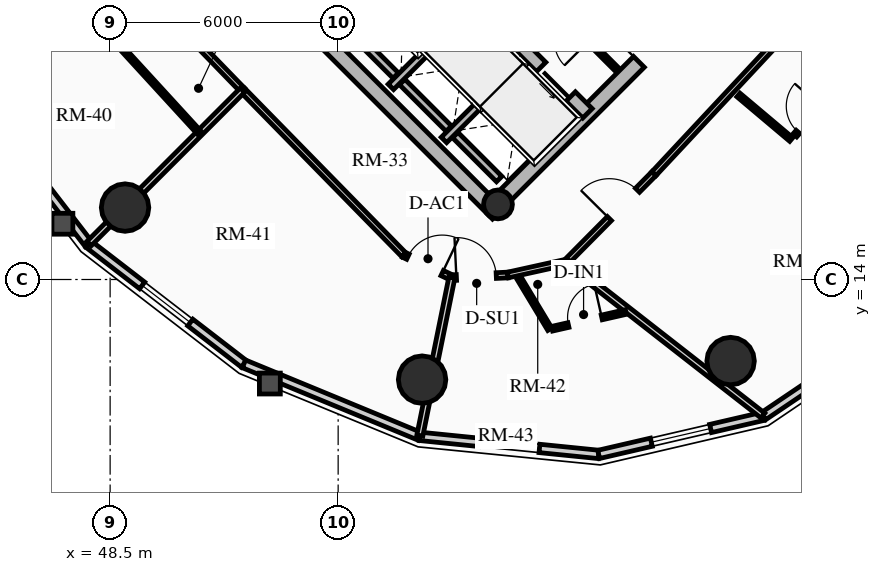
"""IFC4 building model, lengths in metres.
Left out: names, types, materials, properties, quantities, classifications, styles, units other than length and angle.
Written with IfcOpenShell. Run it as: python <this file> out.ifc"""

import sys

from ifc_helpers import new_model, si_unit, direction, frame, frame_2d, origin, origin_2d, place, context, subcontext, project, spatial, rectangle, circle, hollow_circle, extrude, source, transform, mapped, element, fill, save


model = new_model("IFC4")
c1 = context("Model", 3, precision=1e-05, world=origin(), true_north=direction((0.0, 1.0)))
c2 = subcontext(c1, "Body", "Model", "MODEL_VIEW")
j1 = project(units=[si_unit("LENGTHUNIT", "METRE"), si_unit("PLANEANGLEUNIT", "RADIAN")], contexts=[c1])
p1 = place(None, origin())
s1 = spatial("IfcSite", under=j1, at=p1, CompositionType="ELEMENT")
p2 = place(p1, origin())
s2 = spatial("IfcBuilding", under=s1, at=p2, CompositionType="ELEMENT")
p3 = place(p2, frame((0.0, 0.0, 183.61)))
s3 = spatial("IfcBuildingStorey", under=s2, at=p3, CompositionType="ELEMENT", Elevation=183.61)
p4 = place(p3, frame((58.702, 15.732, 0.0), z_axis=(0.0, 0.0, 1.0), x_axis=(-0.707106781187, 0.707106781187, 0.0)))
e1 = element("IfcWall", 1, at=p4, inside=s3, PredefinedType="SHEAR", context=c2, shape_type="SweptSolid", body=[
    extrude(rectangle(XDim=14.1, YDim=0.4, at=frame_2d((7.05, 0.0))), origin(), (0.0, 0.0, 1.0), 2.91),
])
p5 = place(p3, frame((58.561, 15.873, 0.0), z_axis=(0.0, 0.0, 1.0), x_axis=(0.707106781187, 0.707106781187, 0.0)))
e2 = element("IfcWall", 2, at=p5, inside=s3, PredefinedType="SHEAR", context=c2, shape_type="SweptSolid", body=[
    extrude(rectangle(XDim=10.7, YDim=0.4, at=frame_2d((5.35, 0.0))), origin(), (0.0, 0.0, 1.0), 2.91),
])
m1 = source(origin(), c2, "Body", "SweptSolid", [
    extrude(rectangle(XDim=1.5, YDim=2.02, at=frame_2d((0.75, 1.01))), frame((0.0, 0.21, 0.0), z_axis=(0.0, -1.0, 0.0), x_axis=(1.0, 0.0, 0.0)), (0.0, 0.0, 1.0), 0.42),
])
p6 = place(p5, frame((5.45, 0.0, 0.0)))
e3 = element("IfcOpeningElement", 3, at=p6, cuts=e2, PredefinedType="OPENING", context=c2, shape_type="MappedRepresentation", body=[
    mapped(m1, transform((0.0, 0.0, 0.0), x_axis=(1.0, 0.0, 0.0), y_axis=(0.0, 1.0, 0.0), z_axis=(0.0, 0.0, 1.0), scale=1.0)),
])
p7 = place(p3, frame((61.06, 18.373, 0.0), z_axis=(0.0, 0.0, 1.0), x_axis=(-0.707106781187, 0.707106781187, 0.0)))
e4 = element("IfcWall", 4, at=p7, inside=s3, PredefinedType="SHEAR", context=c2, shape_type="SweptSolid", body=[
    extrude(rectangle(XDim=13.7, YDim=0.35, at=frame_2d((6.85, 0.0))), origin(), (0.0, 0.0, 1.0), 2.91),
])
m2 = source(origin(), c2, "Body", "SweptSolid", [
    extrude(rectangle(XDim=1.1, YDim=2.015, at=frame_2d((0.55, 1.007))), frame((0.0, 0.185, 0.0), z_axis=(0.0, -1.0, 0.0), x_axis=(1.0, 0.0, 0.0)), (0.0, 0.0, 1.0), 0.37),
])
p8 = place(p7, frame((4.85, 0.0, 0.0)))
e5 = element("IfcOpeningElement", 5, at=p8, cuts=e4, PredefinedType="OPENING", context=c2, shape_type="MappedRepresentation", body=[
    mapped(m2, transform((0.0, 0.0, 0.0), x_axis=(1.0, 0.0, 0.0), y_axis=(0.0, 1.0, 0.0), z_axis=(0.0, 0.0, 1.0), scale=1.0)),
])
p9 = place(p7, frame((0.625, 0.0, 0.0)))
e6 = element("IfcOpeningElement", 6, at=p9, cuts=e4, PredefinedType="OPENING", context=c2, shape_type="MappedRepresentation", body=[
    mapped(m2, transform((0.0, 0.0, 0.0), x_axis=(1.0, 0.0, 0.0), y_axis=(0.0, 1.0, 0.0), z_axis=(0.0, 0.0, 1.0), scale=1.0)),
])
p10 = place(p7, frame((2.625, 0.0, 0.0)))
e7 = element("IfcOpeningElement", 7, at=p10, cuts=e4, PredefinedType="OPENING", context=c2, shape_type="MappedRepresentation", body=[
    mapped(m2, transform((0.0, 0.0, 0.0), x_axis=(1.0, 0.0, 0.0), y_axis=(0.0, 1.0, 0.0), z_axis=(0.0, 0.0, 1.0), scale=1.0)),
])
m3 = source(origin(), c2, "Body", "SweptSolid", [
    extrude(rectangle(XDim=1.15, YDim=2.02, at=frame_2d((0.575, 1.01))), frame((0.0, 0.185, 0.0), z_axis=(0.0, -1.0, 0.0), x_axis=(1.0, 0.0, 0.0)), (0.0, 0.0, 1.0), 0.37),
])
p11 = place(p7, frame((7.27, 0.0, 0.0)))
e8 = element("IfcOpeningElement", 8, at=p11, cuts=e4, PredefinedType="OPENING", context=c2, shape_type="MappedRepresentation", body=[
    mapped(m3, transform((0.0, 0.0, 0.0), x_axis=(1.0, 0.0, 0.0), y_axis=(0.0, 1.0, 0.0), z_axis=(0.0, 0.0, 1.0), scale=1.0)),
])
p12 = place(p3, frame((58.706, 15.976, 0.0), z_axis=(0.0, 0.0, 1.0), x_axis=(0.707106781187, 0.707106781187, 0.0)))
e9 = element("IfcColumn", 9, at=p12, inside=s3, PredefinedType="COLUMN", context=c2, shape_type="SweptSolid", body=[
    extrude(hollow_circle(Radius=0.38, WallThickness=0.032, at=origin_2d()), origin(), (0.0, 0.0, 1.0), 2.91),
])
for number, where, z_axis, x_axis in (
    (10, (48.893, 15.893, 0.0), (0.0, 0.0, 1.0), (1.0, 0.0, 0.0)),
    (11, (56.709, 11.365, 0.0), (0.0, 0.0, 1.0), (1.0, 0.0, 0.0)),
    (12, (64.827, 11.854, 0.0), (0.0, 0.0, 1.0), (1.0, 0.0, 0.0)),
):
    element("IfcColumn", number, at=place(p3, frame(where, z_axis=z_axis, x_axis=x_axis)), inside=s3, PredefinedType="USERDEFINED", context=c2, shape_type="SweptSolid", body=[
        extrude(circle(Radius=0.625, at=origin_2d()), origin(), (0.0, 0.0, 1.0), 2.91),
    ])
p13 = place(p3, frame((47.932, 14.932, 0.0), z_axis=(0.0, 0.0, 1.0), x_axis=(-0.610569654715, 0.791962560189, 0.0)))
e13 = element("IfcWall", 13, at=p13, inside=s3, PredefinedType="SOLIDWALL", context=c2, shape_type="SweptSolid", body=[
    extrude(rectangle(XDim=5.163, YDim=0.22, at=frame_2d((2.582, 0.0))), origin(), (0.0, 0.0, 1.0), 2.245),
])
p14 = place(p3, frame((52.021, 11.78, 0.0), z_axis=(0.0, 0.0, 1.0), x_axis=(-0.791962560189, 0.610569654715, 0.0)))
e14 = element("IfcWall", 14, at=p14, inside=s3, PredefinedType="SOLIDWALL", context=c2, shape_type="SweptSolid", body=[
    extrude(rectangle(XDim=5.163, YDim=0.22, at=frame_2d((2.582, 0.0))), origin(), (0.0, 0.0, 1.0), 2.245),
])
m4 = source(origin(), c2, "Body", "SweptSolid", [
    extrude(rectangle(XDim=1.6, YDim=1.3, at=frame_2d((0.8, 0.65))), frame((0.0, 0.12, 0.0), z_axis=(0.0, -1.0, 0.0), x_axis=(1.0, 0.0, 0.0)), (0.0, 0.0, 1.0), 0.24),
])
p15 = place(p14, frame((1.782, 0.0, 0.65)))
e15 = element("IfcOpeningElement", 15, at=p15, cuts=e14, PredefinedType="OPENING", context=c2, shape_type="MappedRepresentation", body=[
    mapped(m4, transform((0.0, 0.0, 0.0), x_axis=(1.0, 0.0, 0.0), y_axis=(0.0, 1.0, 0.0), z_axis=(0.0, 0.0, 1.0), scale=1.0)),
])
p16 = place(p3, frame((56.646, 9.873, 0.0), z_axis=(0.0, 0.0, 1.0), x_axis=(-0.924494066201, 0.381196434348, 0.0)))
e16 = element("IfcWall", 16, at=p16, inside=s3, PredefinedType="SOLIDWALL", context=c2, shape_type="SweptSolid", body=[
    extrude(rectangle(XDim=5.003, YDim=0.22, at=frame_2d((2.501, 0.0))), origin(), (0.0, 0.0, 1.0), 2.245),
])
p17 = place(p3, frame((61.355, 9.397, 0.0), z_axis=(0.0, 0.0, 1.0), x_axis=(-0.994943283129, 0.100438356004, 0.0)))
e17 = element("IfcWall", 17, at=p17, inside=s3, PredefinedType="SOLIDWALL", context=c2, shape_type="SweptSolid", body=[
    extrude(rectangle(XDim=4.733, YDim=0.22, at=frame_2d((2.366, 0.0))), origin(), (0.0, 0.0, 1.0), 2.245),
])
p18 = place(p17, frame((1.566, 0.0, 0.65)))
e18 = element("IfcOpeningElement", 18, at=p18, cuts=e17, PredefinedType="OPENING", context=c2, shape_type="MappedRepresentation", body=[
    mapped(m4, transform((0.0, 0.0, 0.0), x_axis=(1.0, 0.0, 0.0), y_axis=(0.0, 1.0, 0.0), z_axis=(0.0, 0.0, 1.0), scale=1.0)),
])
p19 = place(p3, frame((65.687, 10.4, 0.0), z_axis=(0.0, 0.0, 1.0), x_axis=(-0.97422620202, -0.22557328587, 0.0)))
e19 = element("IfcWall", 19, at=p19, inside=s3, PredefinedType="SOLIDWALL", context=c2, shape_type="SweptSolid", body=[
    extrude(rectangle(XDim=4.446, YDim=0.22, at=frame_2d((2.223, 0.0))), origin(), (0.0, 0.0, 1.0), 2.245),
])
p20 = place(p19, frame((1.423, 0.0, 0.65)))
e20 = element("IfcOpeningElement", 20, at=p20, cuts=e19, PredefinedType="OPENING", context=c2, shape_type="MappedRepresentation", body=[
    mapped(m4, transform((0.0, 0.0, 0.0), x_axis=(1.0, 0.0, 0.0), y_axis=(0.0, 1.0, 0.0), z_axis=(0.0, 0.0, 1.0), scale=1.0)),
])
p21 = place(p3, frame((69.217, 12.783, 0.0), z_axis=(0.0, 0.0, 1.0), x_axis=(-0.828817439852, -0.55951912514, 0.0)))
e21 = element("IfcWall", 21, at=p21, inside=s3, PredefinedType="SOLIDWALL", context=c2, shape_type="SweptSolid", body=[
    extrude(rectangle(XDim=4.259, YDim=0.22, at=frame_2d((2.129, 0.0))), origin(), (0.0, 0.0, 1.0), 2.245),
])
p22 = place(p3, frame((55.888, 19.069, 0.0), z_axis=(0.0, 0.0, 1.0), x_axis=(0.707106781187, 0.707106781187, 0.0)))
e22 = element("IfcWall", 22, at=p22, inside=s3, PredefinedType="SHEAR", context=c2, shape_type="SweptSolid", body=[
    extrude(rectangle(XDim=2.97, YDim=0.2, at=frame_2d((1.485, 0.0))), origin(), (0.0, 0.0, 1.0), 2.91),
])
p23 = place(p3, frame((56.015, 19.366, 0.0), z_axis=(0.0, 0.0, 1.0), x_axis=(-0.707106781187, 0.707106781187, 0.0)))
e23 = element("IfcWall", 23, at=p23, inside=s3, PredefinedType="SHEAR", context=c2, shape_type="SweptSolid", body=[
    extrude(rectangle(XDim=2.44, YDim=0.2, at=frame_2d((1.22, 0.0))), origin(), (0.0, 0.0, 1.0), 2.91),
])
p24 = place(p3, frame((57.284, 17.673, 0.0), z_axis=(0.0, 0.0, 1.0), x_axis=(0.707147878904, 0.70706568108, 0.0)))
e24 = element("IfcWall", 24, at=p24, inside=s3, PredefinedType="SHEAR", context=c2, shape_type="SweptSolid", body=[
    extrude(rectangle(XDim=2.97, YDim=0.2, at=frame_2d((1.485, 0.0))), origin(), (0.0, 0.0, 1.0), 2.91),
])
p25 = place(p3, frame((57.412, 17.97, 0.0), z_axis=(0.0, 0.0, 1.0), x_axis=(-0.707106781187, 0.707106781187, 0.0)))
e25 = element("IfcWall", 25, at=p25, inside=s3, PredefinedType="SHEAR", context=c2, shape_type="SweptSolid", body=[
    extrude(rectangle(XDim=1.735, YDim=0.2, at=frame_2d((0.867, 0.0))), origin(), (0.0, 0.0, 1.0), 2.91),
])
p26 = place(p3, frame((58.737, 16.644, 0.0), z_axis=(0.0, 0.0, 1.0), x_axis=(-0.707032117043, 0.707181437447, 0.0)))
e26 = element("IfcWall", 26, at=p26, inside=s3, PredefinedType="SHEAR", context=c2, shape_type="SweptSolid", body=[
    extrude(rectangle(XDim=1.635, YDim=0.2, at=frame_2d((0.817, 0.0))), origin(), (0.0, 0.0, 1.0), 2.91),
])
p27 = place(p3, frame((61.835, 19.529, 0.0), z_axis=(0.0, 0.0, 1.0), x_axis=(-0.707146413884, 0.707067146267, 0.0)))
e27 = element("IfcWall", 27, at=p27, inside=s3, PredefinedType="PARTITIONING", context=c2, shape_type="SweptSolid", body=[
    extrude(rectangle(XDim=3.08, YDim=0.125, at=frame_2d((1.54, 0.0))), origin(), (0.0, 0.0, 1.0), 2.675),
])
m5 = source(origin(), c2, "Body", "SweptSolid", [
    extrude(rectangle(XDim=0.9, YDim=2.005, at=frame_2d((0.45, 1.002))), frame((0.0, 0.073, 0.0), z_axis=(0.0, -1.0, 0.0), x_axis=(1.0, 0.0, 0.0)), (0.0, 0.0, 1.0), 0.145),
])
p28 = place(p27, frame((1.05, 0.0, 0.0)))
e28 = element("IfcOpeningElement", 28, at=p28, cuts=e27, PredefinedType="OPENING", context=c2, shape_type="MappedRepresentation", body=[
    mapped(m5, transform((0.0, 0.0, 0.0), x_axis=(1.0, 0.0, 0.0), y_axis=(0.0, 1.0, 0.0), z_axis=(0.0, 0.0, 1.0), scale=1.0)),
])
p29 = place(p3, frame((47.844, 23.253, 0.0), z_axis=(0.0, 0.0, 1.0), x_axis=(0.696248411352, -0.717800912293, 0.0)))
e29 = element("IfcWall", 29, at=p29, inside=s3, PredefinedType="PARTITIONING", context=c2, shape_type="SweptSolid", body=[
    extrude(rectangle(XDim=5.947, YDim=0.15, at=frame_2d((2.974, 0.0))), origin(), (0.0, 0.0, 1.0), 2.675),
])
p30 = place(p3, frame((51.985, 18.985, 0.0), z_axis=(0.0, 0.0, 1.0), x_axis=(0.699619654291, -0.714515457726, 0.0)))
e30 = element("IfcWall", 30, at=p30, inside=s3, PredefinedType="PARTITIONING", context=c2, shape_type="SweptSolid", body=[
    extrude(rectangle(XDim=6.064, YDim=0.15, at=frame_2d((3.032, 0.0))), origin(), (0.0, 0.0, 1.0), 2.245),
])
p31 = place(p3, frame((56.227, 14.652, 0.0), z_axis=(0.0, 0.0, 1.0), x_axis=(0.902364039563, -0.430974639745, 0.0)))
e31 = element("IfcWall", 31, at=p31, inside=s3, PredefinedType="PARTITIONING", context=c2, shape_type="SweptSolid", body=[
    extrude(rectangle(XDim=1.401, YDim=0.15, at=frame_2d((0.701, 0.0))), origin(), (0.0, 0.0, 1.0), 2.245),
])
m6 = source(origin(), c2, "Body", "SweptSolid", [
    extrude(rectangle(XDim=1.0, YDim=2.015, at=frame_2d((0.5, 1.007))), frame((0.0, 0.085, 0.0), z_axis=(0.0, -1.0, 0.0), x_axis=(1.0, 0.0, 0.0)), (0.0, 0.0, 1.0), 0.17),
])
p32 = place(p31, frame((0.12, 0.0, 0.0)))
e32 = element("IfcOpeningElement", 32, at=p32, cuts=e31, PredefinedType="OPENING", context=c2, shape_type="MappedRepresentation", body=[
    mapped(m6, transform((0.0, 0.0, 0.0), x_axis=(1.0, 0.0, 0.0), y_axis=(0.0, 1.0, 0.0), z_axis=(0.0, 0.0, 1.0), scale=1.0)),
])
p33 = place(p3, frame((57.492, 14.048, 0.0), z_axis=(0.0, 0.0, 1.0), x_axis=(0.99885011351, 0.047942160364, 0.0)))
e33 = element("IfcWall", 33, at=p33, inside=s3, PredefinedType="PARTITIONING", context=c2, shape_type="SweptSolid", body=[
    extrude(rectangle(XDim=1.477, YDim=0.15, at=frame_2d((0.738, 0.0))), origin(), (0.0, 0.0, 1.0), 2.245),
])
m7 = source(origin(), c2, "Body", "SweptSolid", [
    extrude(rectangle(XDim=1.05, YDim=2.015, at=frame_2d((0.525, 1.007))), frame((0.0, 0.085, 0.0), z_axis=(0.0, -1.0, 0.0), x_axis=(1.0, 0.0, 0.0)), (0.0, 0.0, 1.0), 0.17),
])
p34 = place(p33, frame((0.12, 0.0, 0.0)))
e34 = element("IfcOpeningElement", 34, at=p34, cuts=e33, PredefinedType="OPENING", context=c2, shape_type="MappedRepresentation", body=[
    mapped(m7, transform((0.0, 0.0, 0.0), x_axis=(1.0, 0.0, 0.0), y_axis=(0.0, 1.0, 0.0), z_axis=(0.0, 0.0, 1.0), scale=1.0)),
])
p35 = place(p3, frame((58.967, 14.118, 0.0), z_axis=(0.0, 0.0, 1.0), x_axis=(0.976471358036, 0.215647135235, 0.0)))
e35 = element("IfcWall", 35, at=p35, inside=s3, PredefinedType="PARTITIONING", context=c2, shape_type="SweptSolid", body=[
    extrude(rectangle(XDim=1.571, YDim=0.15, at=frame_2d((0.786, 0.0))), origin(), (0.0, 0.0, 1.0), 2.245),
])
p36 = place(p3, frame((60.501, 14.457, 0.0), z_axis=(0.0, 0.0, 1.0), x_axis=(0.704012266258, 0.710187812454, 0.0)))
e36 = element("IfcWall", 36, at=p36, inside=s3, PredefinedType="PARTITIONING", context=c2, shape_type="SweptSolid", body=[
    extrude(rectangle(XDim=3.281, YDim=0.15, at=frame_2d((1.641, 0.0))), origin(), (0.0, 0.0, 1.0), 2.245),
])
p37 = place(p36, frame((1.614, 0.0, 0.0)))
e37 = element("IfcOpeningElement", 37, at=p37, cuts=e36, PredefinedType="OPENING", context=c2, shape_type="MappedRepresentation", body=[
    mapped(m7, transform((0.0, 0.0, 0.0), x_axis=(1.0, 0.0, 0.0), y_axis=(0.0, 1.0, 0.0), z_axis=(0.0, 0.0, 1.0), scale=1.0)),
])
p38 = place(p3, frame((62.812, 16.788, 0.0), z_axis=(0.0, 0.0, 1.0), x_axis=(0.682323555485, 0.731050316757, 0.0)))
e38 = element("IfcWall", 38, at=p38, inside=s3, PredefinedType="PARTITIONING", context=c2, shape_type="SweptSolid", body=[
    extrude(rectangle(XDim=6.559, YDim=0.15, at=frame_2d((3.279, 0.0))), origin(), (0.0, 0.0, 1.0), 2.245),
])
p39 = place(p3, frame((51.985, 18.985, 0.0), z_axis=(0.0, 0.0, 1.0), x_axis=(-0.707106781187, -0.707106781187, 0.0)))
e39 = element("IfcWall", 39, at=p39, inside=s3, PredefinedType="PARTITIONING", context=c2, shape_type="SweptSolid", body=[
    extrude(rectangle(XDim=5.711, YDim=0.16, at=frame_2d((2.855, 0.0))), origin(), (0.0, 0.0, 1.0), 2.245),
])
p40 = place(p3, frame((57.492, 14.048, 0.0), z_axis=(0.0, 0.0, 1.0), x_axis=(-0.198717737532, -0.980056764065, 0.0)))
e40 = element("IfcWall", 40, at=p40, inside=s3, PredefinedType="PARTITIONING", context=c2, shape_type="SweptSolid", body=[
    extrude(rectangle(XDim=4.24, YDim=0.16, at=frame_2d((2.12, 0.0))), origin(), (0.0, 0.0, 1.0), 2.245),
])
p41 = place(p3, frame((60.501, 14.457, 0.0), z_axis=(0.0, 0.0, 1.0), x_axis=(0.788354052705, -0.61522181982, 0.0)))
e41 = element("IfcWall", 41, at=p41, inside=s3, PredefinedType="PARTITIONING", context=c2, shape_type="SweptSolid", body=[
    extrude(rectangle(XDim=6.566, YDim=0.16, at=frame_2d((3.283, 0.0))), origin(), (0.0, 0.0, 1.0), 2.245),
])
p42 = place(p3, frame((46.991, 22.071, 0.0), z_axis=(0.0, 0.0, 1.0), x_axis=(0.675455872419, -0.737400409828, 0.0)))
e42 = element("IfcWall", 42, at=p42, inside=s3, PredefinedType="PARTITIONING", context=c2, shape_type="SweptSolid", body=[
    extrude(rectangle(XDim=5.719, YDim=0.125, at=frame_2d((2.859, 0.0))), origin(), (0.0, 0.0, 1.0), 2.675),
])
p43 = place(p3, frame((59.265, 14.028, 0.0), z_axis=(0.0, 0.0, 1.0), x_axis=(0.515875690436, -0.856663453181, 0.0)))
e43 = element("IfcWall", 43, at=p43, inside=s3, PredefinedType="PARTITIONING", context=c2, shape_type="SweptSolid", body=[
    extrude(rectangle(XDim=1.56, YDim=0.125, at=frame_2d((0.78, 0.0))), origin(), (0.0, 0.0, 1.0), 2.245),
])
p44 = place(p3, frame((60.131, 12.705, 0.0), z_axis=(0.0, 0.0, 1.0), x_axis=(0.975184609806, 0.221393262767, 0.0)))
e44 = element("IfcWall", 44, at=p44, inside=s3, PredefinedType="PARTITIONING", context=c2, shape_type="SweptSolid", body=[
    extrude(rectangle(XDim=1.991, YDim=0.125, at=frame_2d((0.996, 0.0))), origin(), (0.0, 0.0, 1.0), 2.675),
])
p45 = place(p44, frame((0.439, 0.0, 0.0)))
e45 = element("IfcOpeningElement", 45, at=p45, cuts=e44, PredefinedType="OPENING", context=c2, shape_type="MappedRepresentation", body=[
    mapped(m5, transform((0.0, 0.0, 0.0), x_axis=(1.0, 0.0, 0.0), y_axis=(0.0, 1.0, 0.0), z_axis=(0.0, 0.0, 1.0), scale=1.0)),
])
p46 = place(p3, frame((65.033, 18.856, 0.0), z_axis=(0.0, 0.0, 1.0), x_axis=(0.764632588969, -0.644466449, 0.0)))
e46 = element("IfcWall", 46, at=p46, inside=s3, PredefinedType="PARTITIONING", context=c2, shape_type="SweptSolid", body=[
    extrude(rectangle(XDim=1.818, YDim=0.125, at=frame_2d((0.909, 0.0))), origin(), (0.0, 0.0, 1.0), 2.675),
])
p47 = place(p3, frame((66.52, 17.795, 0.0), z_axis=(0.0, 0.0, 1.0), x_axis=(0.658266024679, 0.752785388244, 0.0)))
e47 = element("IfcWall", 47, at=p47, inside=s3, PredefinedType="PARTITIONING", context=c2, shape_type="SweptSolid", body=[
    extrude(rectangle(XDim=2.826, YDim=0.125, at=frame_2d((1.413, 0.0))), origin(), (0.0, 0.0, 1.0), 2.245),
])
p48 = place(p47, frame((0.12, 0.0, 0.0)))
e48 = element("IfcOpeningElement", 48, at=p48, cuts=e47, PredefinedType="OPENING", context=c2, shape_type="MappedRepresentation", body=[
    mapped(m5, transform((0.0, 0.0, 0.0), x_axis=(1.0, 0.0, 0.0), y_axis=(0.0, 1.0, 0.0), z_axis=(0.0, 0.0, 1.0), scale=1.0)),
])
m8 = source(origin(), c2, "Body", "SweptSolid", [
    extrude(rectangle(XDim=1.6, YDim=1.3, at=frame_2d((0.8, 0.65))), frame((0.0, 0.03, 0.0), z_axis=(0.0, -1.0, 0.0), x_axis=(1.0, 0.0, 0.0)), (0.0, 0.0, 1.0), 0.06),
])
p49 = place(p15, origin())
e49 = element("IfcWindow", 49, at=p49, inside=s3, PartitioningType="SINGLE_PANEL", PredefinedType="WINDOW", context=c2, shape_type="MappedRepresentation", body=[
    mapped(m8, transform((0.0, 0.0, 0.0), x_axis=(1.0, 0.0, 0.0), y_axis=(0.0, 1.0, 0.0), z_axis=(0.0, 0.0, 1.0), scale=1.0)),
])
fill(e15, e49)
p50 = place(p18, origin())
e50 = element("IfcWindow", 50, at=p50, inside=s3, PartitioningType="SINGLE_PANEL", PredefinedType="WINDOW", context=c2, shape_type="MappedRepresentation", body=[
    mapped(m8, transform((0.0, 0.0, 0.0), x_axis=(1.0, 0.0, 0.0), y_axis=(0.0, 1.0, 0.0), z_axis=(0.0, 0.0, 1.0), scale=1.0)),
])
fill(e18, e50)
p51 = place(p20, origin())
e51 = element("IfcWindow", 51, at=p51, inside=s3, PartitioningType="SINGLE_PANEL", PredefinedType="WINDOW", context=c2, shape_type="MappedRepresentation", body=[
    mapped(m8, transform((0.0, 0.0, 0.0), x_axis=(1.0, 0.0, 0.0), y_axis=(0.0, 1.0, 0.0), z_axis=(0.0, 0.0, 1.0), scale=1.0)),
])
fill(e20, e51)
m9 = source(origin(), c2, "Body", "SweptSolid", [
    extrude(rectangle(XDim=1.1, YDim=2.015, at=frame_2d((0.55, 1.007))), frame((0.0, 0.025, 0.0), z_axis=(0.0, -1.0, 0.0), x_axis=(1.0, 0.0, 0.0)), (0.0, 0.0, 1.0), 0.05),
])
p52 = place(p9, origin())
e52 = element("IfcDoor", 52, at=p52, inside=s3, OperationType="SLIDING_TO_LEFT", PredefinedType="DOOR", context=c2, shape_type="MappedRepresentation", body=[
    mapped(m9, transform((0.0, 0.0, 0.0), x_axis=(1.0, 0.0, 0.0), y_axis=(0.0, 1.0, 0.0), z_axis=(0.0, 0.0, 1.0), scale=1.0)),
])
fill(e6, e52)
m10 = source(origin(), c2, "Body", "SweptSolid", [
    extrude(rectangle(XDim=1.5, YDim=2.02, at=frame_2d((0.75, 1.01))), frame((0.0, 0.025, 0.0), z_axis=(0.0, -1.0, 0.0), x_axis=(1.0, 0.0, 0.0)), (0.0, 0.0, 1.0), 0.05),
])
p53 = place(p6, origin())
e53 = element("IfcDoor", 53, at=p53, inside=s3, OperationType="DOUBLE_DOOR_SINGLE_SWING", PredefinedType="DOOR", context=c2, shape_type="MappedRepresentation", body=[
    mapped(m10, transform((0.0, 0.0, 0.0), x_axis=(1.0, 0.0, 0.0), y_axis=(0.0, 1.0, 0.0), z_axis=(0.0, 0.0, 1.0), scale=1.0)),
])
fill(e3, e53)
m11 = source(origin(), c2, "Body", "SweptSolid", [
    extrude(rectangle(XDim=1.0, YDim=2.015, at=frame_2d((0.5, 1.007))), frame((0.0, 0.025, 0.0), z_axis=(0.0, -1.0, 0.0), x_axis=(1.0, 0.0, 0.0)), (0.0, 0.0, 1.0), 0.05),
])
p54 = place(p32, origin())
e54 = element("IfcDoor", 54, at=p54, inside=s3, OperationType="SINGLE_SWING_RIGHT", PredefinedType="DOOR", context=c2, shape_type="MappedRepresentation", body=[
    mapped(m11, transform((0.0, 0.0, 0.0), x_axis=(1.0, 0.0, 0.0), y_axis=(0.0, 1.0, 0.0), z_axis=(0.0, 0.0, 1.0), scale=1.0)),
])
fill(e32, e54)
m12 = source(origin(), c2, "Body", "SweptSolid", [
    extrude(rectangle(XDim=1.05, YDim=2.015, at=frame_2d((0.525, 1.007))), frame((0.0, 0.025, 0.0), z_axis=(0.0, -1.0, 0.0), x_axis=(1.0, 0.0, 0.0)), (0.0, 0.0, 1.0), 0.05),
])
p55 = place(p34, origin())
e55 = element("IfcDoor", 55, at=p55, inside=s3, OperationType="SINGLE_SWING_LEFT", PredefinedType="DOOR", context=c2, shape_type="MappedRepresentation", body=[
    mapped(m12, transform((0.0, 0.0, 0.0), x_axis=(1.0, 0.0, 0.0), y_axis=(0.0, 1.0, 0.0), z_axis=(0.0, 0.0, 1.0), scale=1.0)),
])
fill(e34, e55)
m13 = source(origin(), c2, "Body", "SweptSolid", [
    extrude(rectangle(XDim=0.9, YDim=2.005, at=frame_2d((0.45, 1.002))), frame((0.0, 0.025, 0.0), z_axis=(0.0, -1.0, 0.0), x_axis=(1.0, 0.0, 0.0)), (0.0, 0.0, 1.0), 0.05),
])
p56 = place(p45, origin())
e56 = element("IfcDoor", 56, at=p56, inside=s3, OperationType="SINGLE_SWING_RIGHT", PredefinedType="DOOR", context=c2, shape_type="MappedRepresentation", body=[
    mapped(m13, transform((0.0, 0.0, 0.0), x_axis=(1.0, 0.0, 0.0), y_axis=(0.0, 1.0, 0.0), z_axis=(0.0, 0.0, 1.0), scale=1.0)),
])
fill(e45, e56)
p57 = place(p37, origin())
e57 = element("IfcDoor", 57, at=p57, inside=s3, OperationType="SINGLE_SWING_LEFT", PredefinedType="DOOR", context=c2, shape_type="MappedRepresentation", body=[
    mapped(m12, transform((0.0, 0.0, 0.0), x_axis=(1.0, 0.0, 0.0), y_axis=(0.0, 1.0, 0.0), z_axis=(0.0, 0.0, 1.0), scale=1.0)),
])
fill(e37, e57)
p58 = place(p48, origin())
e58 = element("IfcDoor", 58, at=p58, inside=s3, OperationType="SINGLE_SWING_RIGHT", PredefinedType="DOOR", context=c2, shape_type="MappedRepresentation", body=[
    mapped(m13, transform((0.0, 0.0, 0.0), x_axis=(1.0, 0.0, 0.0), y_axis=(0.0, 1.0, 0.0), z_axis=(0.0, 0.0, 1.0), scale=1.0)),
])
fill(e48, e58)
save(model, sys.argv[1])
